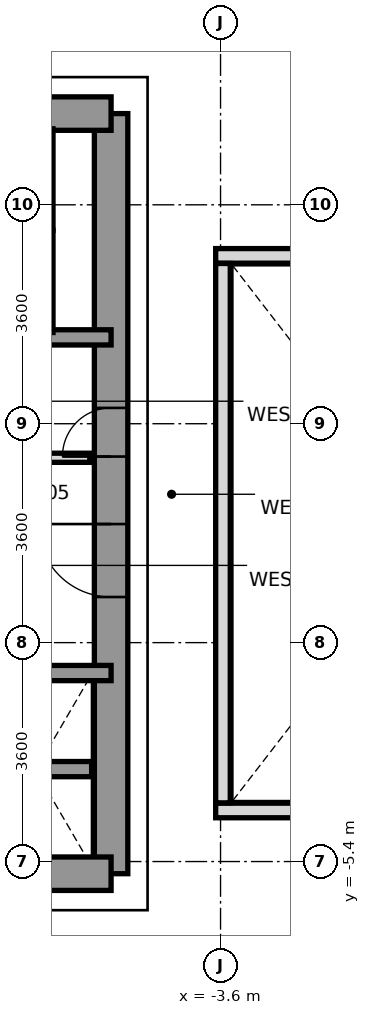
"""IFC4 building model, lengths in metres.
Left out: names, types, materials, properties, quantities, classifications, styles, units other than length and angle.
Written with IfcOpenShell. Run it as: python <this file> out.ifc"""

import sys

from ifc_helpers import new_model, si_unit, direction, frame, frame_2d, origin, place, context, subcontext, project, spatial, rectangle, extrude, source, transform, mapped, element, fill, save


model = new_model("IFC4")
c1 = context("Model", 3, precision=1e-05, world=origin(), true_north=direction((0.0, 1.0)))
c2 = subcontext(c1, "Body", "Model", "MODEL_VIEW")
j1 = project(units=[si_unit("LENGTHUNIT", "METRE"), si_unit("PLANEANGLEUNIT", "RADIAN")], contexts=[c1])
p1 = place(None, origin())
s1 = spatial("IfcSite", under=j1, at=p1, CompositionType="ELEMENT")
p2 = place(p1, origin())
s2 = spatial("IfcBuilding", under=s1, at=p2, CompositionType="ELEMENT")
p3 = place(p2, frame((0.0, 0.0, 78.2)))
s3 = spatial("IfcBuildingStorey", under=s2, at=p3, CompositionType="ELEMENT", Elevation=78.2)
p4 = place(p3, frame((-5.4, -5.6, 0.0), z_axis=(0.0, 0.0, 1.0), x_axis=(0.0, 1.0, 0.0)))
e1 = element("IfcWall", 1, at=p4, inside=s3, PredefinedType="SHEAR", context=c2, shape_type="SweptSolid", body=[
    extrude(rectangle(XDim=12.5, YDim=0.55, at=frame_2d((6.25, 0.0))), origin(), (0.0, 0.0, 1.0), 3.2),
])
p5 = place(p4, frame((4.55, 0.0, 0.0)))
e2 = element("IfcOpeningElement", 2, at=p5, cuts=e1, PredefinedType="OPENING", context=c2, shape_type="SweptSolid", body=[
    extrude(rectangle(XDim=1.2, YDim=2.2, at=frame_2d((0.6, 1.1))), frame((0.0, 0.285, 0.0), z_axis=(0.0, -1.0, 0.0), x_axis=(1.0, 0.0, 0.0)), (0.0, 0.0, 1.0), 0.57),
])
p6 = place(p4, frame((6.86, 0.0, 0.0)))
e3 = element("IfcOpeningElement", 3, at=p6, cuts=e1, PredefinedType="OPENING", context=c2, shape_type="SweptSolid", body=[
    extrude(rectangle(XDim=0.8, YDim=2.1, at=frame_2d((0.4, 1.05))), frame((0.0, 0.285, 0.0), z_axis=(0.0, -1.0, 0.0), x_axis=(1.0, 0.0, 0.0)), (0.0, 0.0, 1.0), 0.57),
])
p7 = place(p3, frame((-11.381, 6.9, 0.0), z_axis=(0.0, 0.0, 1.0), x_axis=(1.0, 0.0, 0.0)))
e4 = element("IfcWall", 4, at=p7, inside=s3, PredefinedType="SHEAR", context=c2, shape_type="SweptSolid", body=[
    extrude(rectangle(XDim=5.981, YDim=0.55, at=frame_2d((2.991, 0.0))), origin(), (0.0, 0.0, 1.0), 3.2),
])
p8 = place(p3, frame((-13.2, -5.6, 0.0), z_axis=(0.0, 0.0, 1.0), x_axis=(1.0, 0.0, 0.0)))
e5 = element("IfcWall", 5, at=p8, inside=s3, PredefinedType="SHEAR", context=c2, shape_type="SweptSolid", body=[
    extrude(rectangle(XDim=7.8, YDim=0.55, at=frame_2d((3.9, 0.0))), origin(), (0.0, 0.0, 1.0), 3.2),
])
p9 = place(p8, frame((3.6, 0.0, 0.0)))
e6 = element("IfcOpeningElement", 6, at=p9, cuts=e5, PredefinedType="OPENING", context=c2, shape_type="SweptSolid", body=[
    extrude(rectangle(XDim=1.2, YDim=2.2, at=frame_2d((0.6, 1.1))), frame((0.0, 0.285, 0.0), z_axis=(0.0, -1.0, 0.0), x_axis=(1.0, 0.0, 0.0)), (0.0, 0.0, 1.0), 0.57),
])
p10 = place(p3, frame((-8.18, 3.22, 0.0), z_axis=(0.0, 0.0, 1.0), x_axis=(1.0, 0.0, 0.0)))
e7 = element("IfcWall", 7, at=p10, inside=s3, PredefinedType="SOLIDWALL", context=c2, shape_type="SweptSolid", body=[
    extrude(rectangle(XDim=2.78, YDim=0.25, at=frame_2d((1.39, 0.0))), origin(), (0.0, 0.0, 1.0), 3.2),
])
p11 = place(p3, frame((-8.48, -2.3, 0.0), z_axis=(0.0, 0.0, 1.0), x_axis=(1.0, 0.0, 0.0)))
e8 = element("IfcWall", 8, at=p11, inside=s3, PredefinedType="SOLIDWALL", context=c2, shape_type="SweptSolid", body=[
    extrude(rectangle(XDim=3.08, YDim=0.25, at=frame_2d((1.54, 0.0))), origin(), (0.0, 0.0, 1.0), 3.2),
])
p12 = place(p3, frame((-7.56, -3.88, 0.0), z_axis=(0.0, 0.0, 1.0), x_axis=(1.0, 0.0, 0.0)))
e9 = element("IfcWall", 9, at=p12, inside=s3, PredefinedType="SOLIDWALL", context=c2, shape_type="SweptSolid", body=[
    extrude(rectangle(XDim=1.84, YDim=0.25, at=frame_2d((0.92, 0.0))), origin(), (0.0, 0.0, 1.0), 3.2),
])
p13 = place(p3, frame((-6.48, 3.3, 0.0), z_axis=(0.0, 0.0, 1.0), x_axis=(0.0, 1.0, 0.0)))
e10 = element("IfcWall", 10, at=p13, inside=s3, PredefinedType="SOLIDWALL", context=c2, shape_type="SweptSolid", body=[
    extrude(rectangle(XDim=1.68, YDim=0.25, at=frame_2d((0.84, 0.0))), origin(), (0.0, 0.0, 1.0), 3.2),
])
p14 = place(p3, frame((-6.48, 4.98, 0.0), z_axis=(0.0, 0.0, 1.0), x_axis=(0.0, 1.0, 0.0)))
e11 = element("IfcWall", 11, at=p14, inside=s3, PredefinedType="SOLIDWALL", context=c2, shape_type="SweptSolid", body=[
    extrude(rectangle(XDim=1.67, YDim=0.25, at=frame_2d((0.835, 0.0))), origin(), (0.0, 0.0, 1.0), 3.2),
])
p15 = place(p3, frame((-8.14, 1.24, 0.0), z_axis=(0.0, 0.0, 1.0), x_axis=(1.0, 0.0, 0.0)))
e12 = element("IfcWall", 12, at=p15, inside=s3, PredefinedType="PARTITIONING", context=c2, shape_type="SweptSolid", body=[
    extrude(rectangle(XDim=2.39, YDim=0.15, at=frame_2d((1.195, 0.0))), origin(), (0.0, 0.0, 1.0), 2.3),
])
for number, where, z_axis, x_axis in (
    (13, (-3.68, -4.56, 0.0), (0.0, 0.0, 1.0), (1.0, 0.0, 0.0)),
    (14, (-3.68, 4.56, 0.0), (0.0, 0.0, 1.0), (1.0, 0.0, 0.0)),
):
    element("IfcWall", number, at=place(p3, frame(where, z_axis=z_axis, x_axis=x_axis)), inside=s3, PredefinedType="PARAPET", context=c2, shape_type="SweptSolid", body=[
        extrude(rectangle(XDim=7.36, YDim=0.24, at=frame_2d((3.68, 0.0))), origin(), (0.0, 0.0, 1.0), 1.15),
    ])
p16 = place(p3, frame((-3.56, -4.435, 0.0), z_axis=(0.0, 0.0, 1.0), x_axis=(0.0, 1.0, 0.0)))
e15 = element("IfcWall", 15, at=p16, inside=s3, PredefinedType="PARAPET", context=c2, shape_type="SweptSolid", body=[
    extrude(rectangle(XDim=8.87, YDim=0.24, at=frame_2d((4.435, 0.0))), origin(), (0.0, 0.0, 1.0), 1.15),
])
m1 = source(origin(), c2, "Body", "SweptSolid", [
    extrude(rectangle(XDim=1.2, YDim=2.2, at=frame_2d((0.6, 1.1))), frame((0.0, 0.025, 0.0), z_axis=(0.0, -1.0, 0.0), x_axis=(1.0, 0.0, 0.0)), (0.0, 0.0, 1.0), 0.05),
])
p17 = place(p5, origin())
e16 = element("IfcDoor", 16, at=p17, inside=s3, OperationType="SINGLE_SWING_RIGHT", PredefinedType="DOOR", context=c2, shape_type="MappedRepresentation", body=[
    mapped(m1, transform((0.0, 0.0, 0.0), x_axis=(1.0, 0.0, 0.0), y_axis=(0.0, 1.0, 0.0), z_axis=(0.0, 0.0, 1.0), scale=1.0)),
])
fill(e2, e16)
m2 = source(origin(), c2, "Body", "SweptSolid", [
    extrude(rectangle(XDim=0.8, YDim=2.1, at=frame_2d((0.4, 1.05))), frame((0.0, 0.025, 0.0), z_axis=(0.0, -1.0, 0.0), x_axis=(1.0, 0.0, 0.0)), (0.0, 0.0, 1.0), 0.05),
])
p18 = place(p6, origin())
e17 = element("IfcDoor", 17, at=p18, inside=s3, OperationType="SINGLE_SWING_LEFT", PredefinedType="DOOR", context=c2, shape_type="MappedRepresentation", body=[
    mapped(m2, transform((0.0, 0.0, 0.0), x_axis=(1.0, 0.0, 0.0), y_axis=(0.0, 1.0, 0.0), z_axis=(0.0, 0.0, 1.0), scale=1.0)),
])
fill(e3, e17)
save(model, sys.argv[1])
